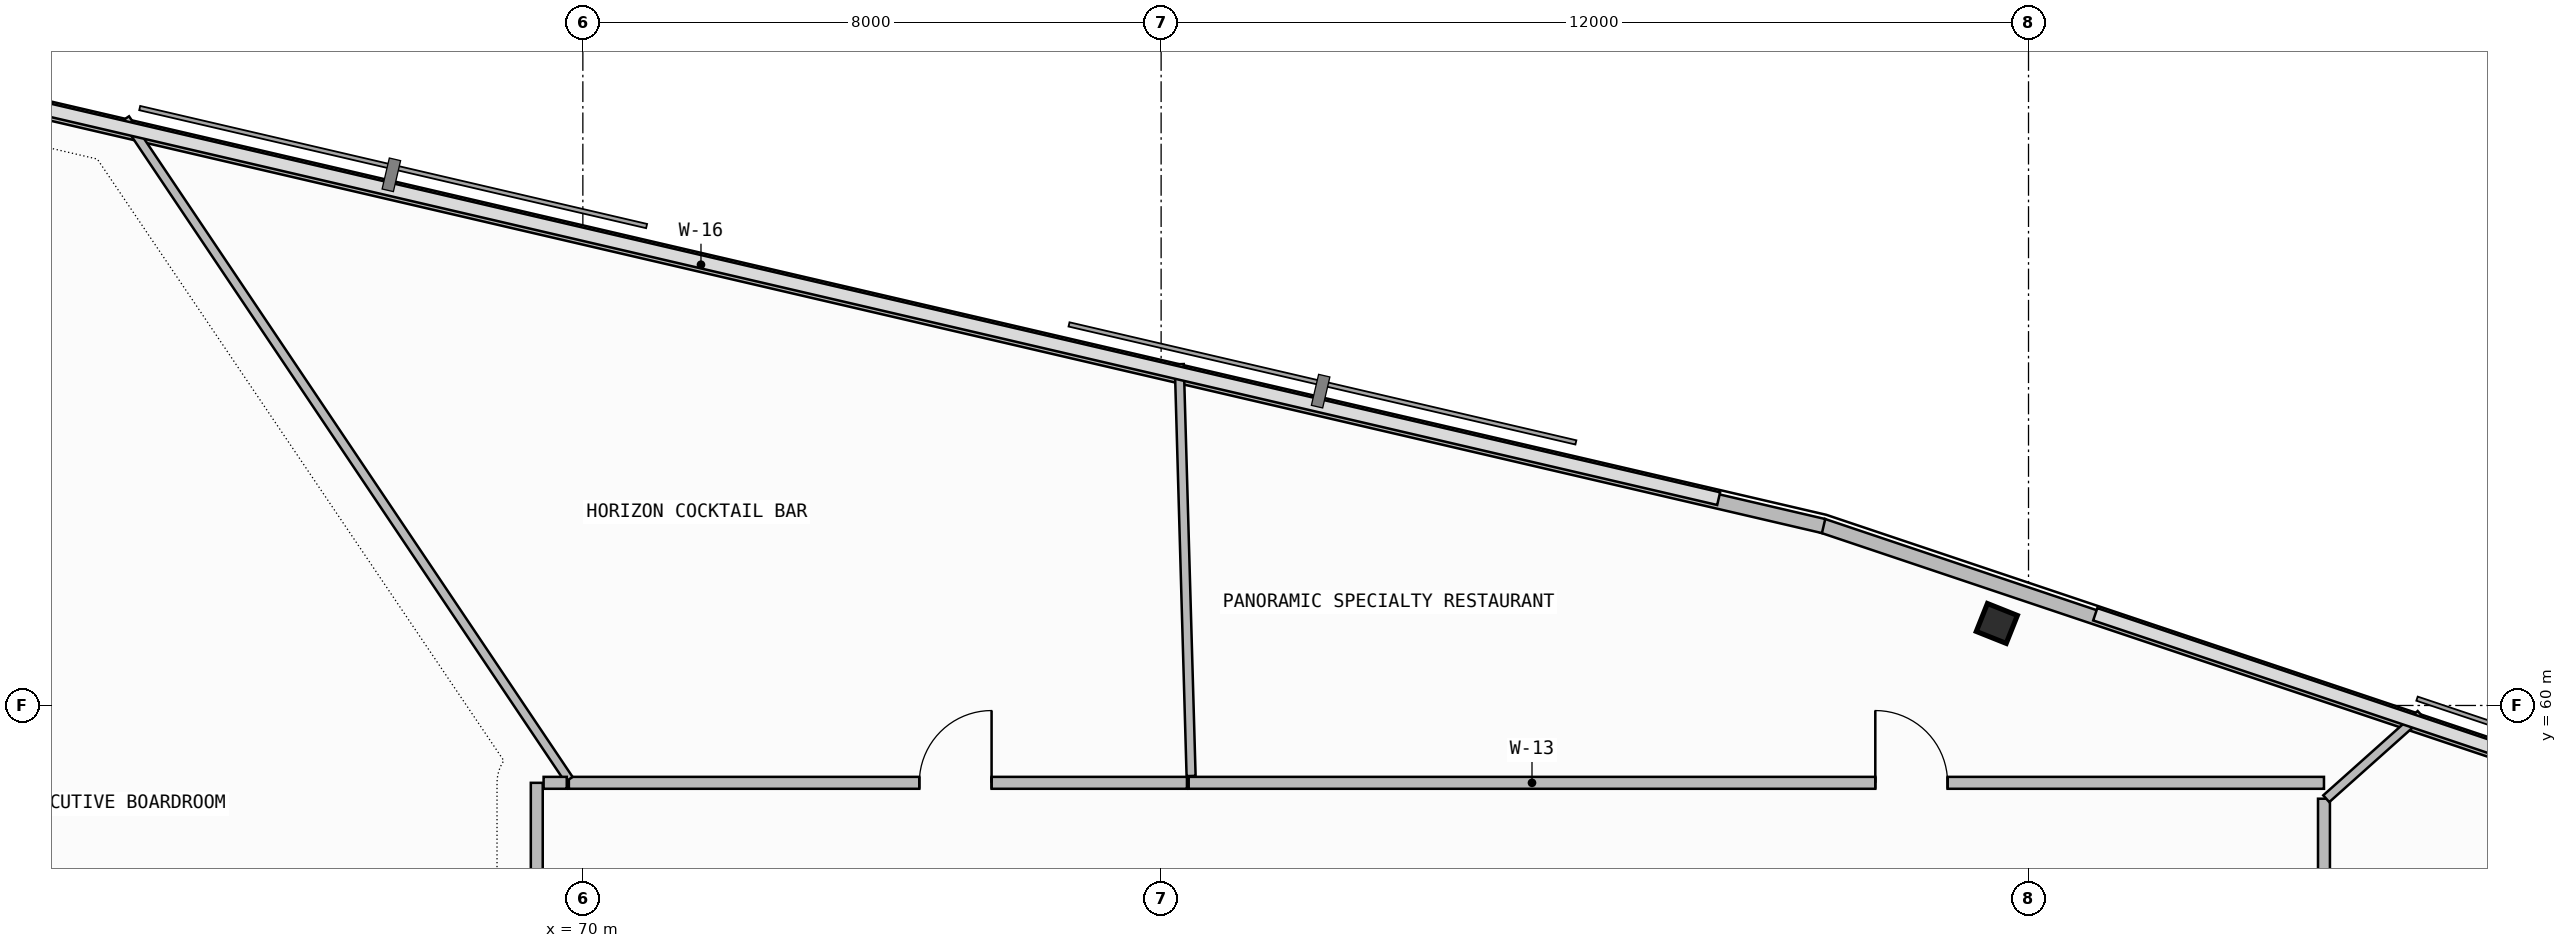
"""IFC4 building model, lengths in metres.
Left out: names, types, materials, properties, quantities, classifications, styles, units other than length and angle.
Written with IfcOpenShell. Run it as: python <this file> out.ifc"""

import sys

from ifc_helpers import new_model, si_unit, direction, frame, frame_2d, origin, origin_2d, place, context, subcontext, project, spatial, rectangle, i_section, extrude, element, fill, save


model = new_model("IFC4")
c1 = context("Model", 3, precision=1e-05, world=origin(), true_north=direction((0.0, 1.0)))
c2 = subcontext(c1, "Body", "Model", "MODEL_VIEW")
j1 = project(units=[si_unit("LENGTHUNIT", "METRE"), si_unit("PLANEANGLEUNIT", "RADIAN")], contexts=[c1])
p1 = place(None, origin())
s1 = spatial("IfcSite", under=j1, at=p1, CompositionType="ELEMENT")
p2 = place(p1, origin())
s2 = spatial("IfcBuilding", under=s1, at=p2, CompositionType="ELEMENT")
p3 = place(p2, frame((0.0, 0.0, 193.18)))
s3 = spatial("IfcBuildingStorey", under=s2, at=p3, CompositionType="ELEMENT", Elevation=193.18)
p4 = place(p3, frame((89.562, 61.135, 0.0), z_axis=(0.0, 0.0, 1.0), x_axis=(0.37055743751, 0.928809552872, 0.0)))
e1 = element("IfcColumn", 1, at=p4, inside=s3, PredefinedType="COLUMN", context=c2, shape_type="SweptSolid", body=[
    extrude(i_section(OverallWidth=0.416, OverallDepth=0.446, WebThickness=0.039, FlangeThickness=0.063, FilletRadius=0.015, at=origin_2d()), origin(), (0.0, 0.0, 1.0), 3.52),
])
p5 = place(p3, frame((56.728, 62.172, -0.26), z_axis=(0.0, 0.0, 1.0), x_axis=(0.394736752992, -0.918794261974, 0.0)))
e2 = element("IfcWall", 2, at=p5, inside=s3, PredefinedType="SHEAR", context=c2, shape_type="SweptSolid", body=[
    extrude(rectangle(XDim=19.353, YDim=0.7, at=frame_2d((9.676, 0.0))), origin(), (0.0, 0.0, 1.0), 3.28),
])
p6 = place(p5, frame((1.347, 0.0, 1.2)))
e3 = element("IfcOpeningElement", 3, at=p6, cuts=e2, PredefinedType="OPENING", context=c2, shape_type="SweptSolid", body=[
    extrude(rectangle(XDim=3.0, YDim=0.9, at=frame_2d((1.5, 0.45))), frame((0.0, 0.36, 0.0), z_axis=(0.0, -1.0, 0.0), x_axis=(1.0, 0.0, 0.0)), (0.0, 0.0, 1.0), 0.72),
])
p7 = place(p3, frame((117.363, 52.344, 0.0), z_axis=(0.0, 0.0, 1.0), x_axis=(-0.94800468727, 0.31825636351, 0.0)))
e4 = element("IfcWall", 4, at=p7, inside=s3, PredefinedType="PARAPET", context=c2, shape_type="SweptSolid", body=[
    extrude(rectangle(XDim=31.869, YDim=0.2, at=frame_2d((15.935, 0.0))), origin(), (0.0, 0.0, 1.0), 1.15),
])
p8 = place(p3, frame((87.165, 62.482, 0.0), z_axis=(0.0, 0.0, 1.0), x_axis=(-0.973958867717, 0.226724775876, 0.0)))
e5 = element("IfcWall", 5, at=p8, inside=s3, PredefinedType="PARAPET", context=c2, shape_type="SweptSolid", body=[
    extrude(rectangle(XDim=31.892, YDim=0.2, at=frame_2d((15.946, 0.0))), origin(), (0.0, 0.0, 1.0), 1.15),
])
p9 = place(p3, frame((94.087, 47.883, 0.0), z_axis=(0.0, 0.0, 1.0), x_axis=(0.0, 1.0, 0.0)))
e6 = element("IfcWall", 6, at=p9, inside=s3, PredefinedType="PARTITIONING", context=c2, shape_type="SweptSolid", body=[
    extrude(rectangle(XDim=10.827, YDim=0.165, at=frame_2d((5.414, 0.0))), origin(), (0.0, 0.0, 1.0), 2.405),
])
p10 = place(p9, frame((3.5, 0.0, 0.0)))
e7 = element("IfcOpeningElement", 7, at=p10, cuts=e6, PredefinedType="OPENING", context=c2, shape_type="SweptSolid", body=[
    extrude(rectangle(XDim=1.0, YDim=2.2, at=frame_2d((0.5, 1.1))), frame((0.0, 0.093, 0.0), z_axis=(0.0, -1.0, 0.0), x_axis=(1.0, 0.0, 0.0)), (0.0, 0.0, 1.0), 0.185),
])
p11 = place(p3, frame((94.119, 58.71, 0.0), z_axis=(0.0, 0.0, 1.0), x_axis=(0.745853553409, 0.66610995854, 0.0)))
e8 = element("IfcWall", 8, at=p11, inside=s3, PredefinedType="PARTITIONING", context=c2, shape_type="SweptSolid", body=[
    extrude(rectangle(XDim=1.751, YDim=0.125, at=frame_2d((0.875, 0.0))), origin(), (0.0, 0.0, 1.0), 3.02),
])
p12 = place(p3, frame((94.087, 58.93, 0.0), z_axis=(0.0, 0.0, 1.0), x_axis=(-1.0, 0.0, 0.0)))
e9 = element("IfcWall", 9, at=p12, inside=s3, PredefinedType="PARTITIONING", context=c2, shape_type="SweptSolid", body=[
    extrude(rectangle(XDim=15.706, YDim=0.165, at=frame_2d((7.853, 0.0))), origin(), (0.0, 0.0, 1.0), 2.405),
])
p13 = place(p12, frame((5.207, 0.0, 0.0)))
e10 = element("IfcOpeningElement", 10, at=p13, cuts=e9, PredefinedType="OPENING", context=c2, shape_type="SweptSolid", body=[
    extrude(rectangle(XDim=1.0, YDim=2.2, at=frame_2d((0.5, 1.1))), frame((0.0, 0.093, 0.0), z_axis=(0.0, -1.0, 0.0), x_axis=(1.0, 0.0, 0.0)), (0.0, 0.0, 1.0), 0.185),
])
p14 = place(p3, frame((78.415, 59.024, 0.0), z_axis=(0.0, 0.0, 1.0), x_axis=(-0.028744438942, 0.999586793245, 0.0)))
e11 = element("IfcWall", 11, at=p14, inside=s3, PredefinedType="PARTITIONING", context=c2, shape_type="SweptSolid", body=[
    extrude(rectangle(XDim=5.699, YDim=0.125, at=frame_2d((2.85, 0.0))), origin(), (0.0, 0.0, 1.0), 3.02),
])
p15 = place(p3, frame((78.357, 58.93, 0.0), z_axis=(0.0, 0.0, 1.0), x_axis=(-1.0, 0.0, 0.0)))
e12 = element("IfcWall", 12, at=p15, inside=s3, PredefinedType="PARTITIONING", context=c2, shape_type="SweptSolid", body=[
    extrude(rectangle(XDim=8.551, YDim=0.165, at=frame_2d((4.275, 0.0))), origin(), (0.0, 0.0, 1.0), 2.505),
])
p16 = place(p15, frame((2.703, 0.0, 0.0)))
e13 = element("IfcOpeningElement", 13, at=p16, cuts=e12, PredefinedType="OPENING", context=c2, shape_type="SweptSolid", body=[
    extrude(rectangle(XDim=1.0, YDim=2.2, at=frame_2d((0.5, 1.1))), frame((0.0, 0.093, 0.0), z_axis=(0.0, -1.0, 0.0), x_axis=(1.0, 0.0, 0.0)), (0.0, 0.0, 1.0), 0.185),
])
p17 = place(p3, frame((69.806, 58.976, 0.0), z_axis=(0.0, 0.0, 1.0), x_axis=(-0.557460829641, 0.830203242234, 0.0)))
e14 = element("IfcWall", 14, at=p17, inside=s3, PredefinedType="PARTITIONING", context=c2, shape_type="SweptSolid", body=[
    extrude(rectangle(XDim=11.008, YDim=0.125, at=frame_2d((5.504, 0.0))), origin(), (0.0, 0.0, 1.0), 2.505),
])
p18 = place(p3, frame((69.363, 58.93, 0.0), z_axis=(0.0, 0.0, 1.0), x_axis=(0.0, -1.0, 0.0)))
e15 = element("IfcWall", 15, at=p18, inside=s3, PredefinedType="PARTITIONING", context=c2, shape_type="SweptSolid", body=[
    extrude(rectangle(XDim=9.164, YDim=0.165, at=frame_2d((4.582, 0.0))), origin(), (0.0, 0.0, 1.0), 2.505),
])
p19 = place(p18, frame((4.082, 0.0, 0.0)))
e16 = element("IfcOpeningElement", 16, at=p19, cuts=e15, PredefinedType="OPENING", context=c2, shape_type="SweptSolid", body=[
    extrude(rectangle(XDim=1.0, YDim=2.2, at=frame_2d((0.5, 1.1))), frame((0.0, 0.093, 0.0), z_axis=(0.0, -1.0, 0.0), x_axis=(1.0, 0.0, 0.0)), (0.0, 0.0, 1.0), 0.185),
])
p20 = place(p3, frame((69.777, 58.93, 0.0), z_axis=(0.0, 0.0, 1.0), x_axis=(-1.0, 0.0, 0.0)))
e17 = element("IfcWall", 17, at=p20, inside=s3, PredefinedType="PARTITIONING", context=c2, shape_type="SweptSolid", body=[
    extrude(rectangle(XDim=0.32, YDim=0.165, at=frame_2d((0.16, 0.0))), origin(), (0.0, 0.0, 1.0), 2.505),
])
p21 = place(p13, frame((1.0, 0.0, 0.0), z_axis=(0.0, 0.0, 1.0), x_axis=(-1.0, 0.0, 0.0)))
e18 = element("IfcDoor", 18, at=p21, inside=s3, OperationType="SINGLE_SWING_LEFT", PredefinedType="DOOR", context=c2, shape_type="SweptSolid", body=[
    extrude(rectangle(XDim=1.0, YDim=2.2, at=frame_2d((0.5, 1.1))), frame((0.0, 0.025, 0.0), z_axis=(0.0, -1.0, 0.0), x_axis=(1.0, 0.0, 0.0)), (0.0, 0.0, 1.0), 0.05),
])
fill(e10, e18)
p22 = place(p16, frame((1.0, 0.0, 0.0), z_axis=(0.0, 0.0, 1.0), x_axis=(-1.0, 0.0, 0.0)))
e19 = element("IfcDoor", 19, at=p22, inside=s3, OperationType="SINGLE_SWING_RIGHT", PredefinedType="DOOR", context=c2, shape_type="SweptSolid", body=[
    extrude(rectangle(XDim=1.0, YDim=2.2, at=frame_2d((0.5, 1.1))), frame((0.0, 0.025, 0.0), z_axis=(0.0, -1.0, 0.0), x_axis=(1.0, 0.0, 0.0)), (0.0, 0.0, 1.0), 0.05),
])
fill(e13, e19)
save(model, sys.argv[1])
